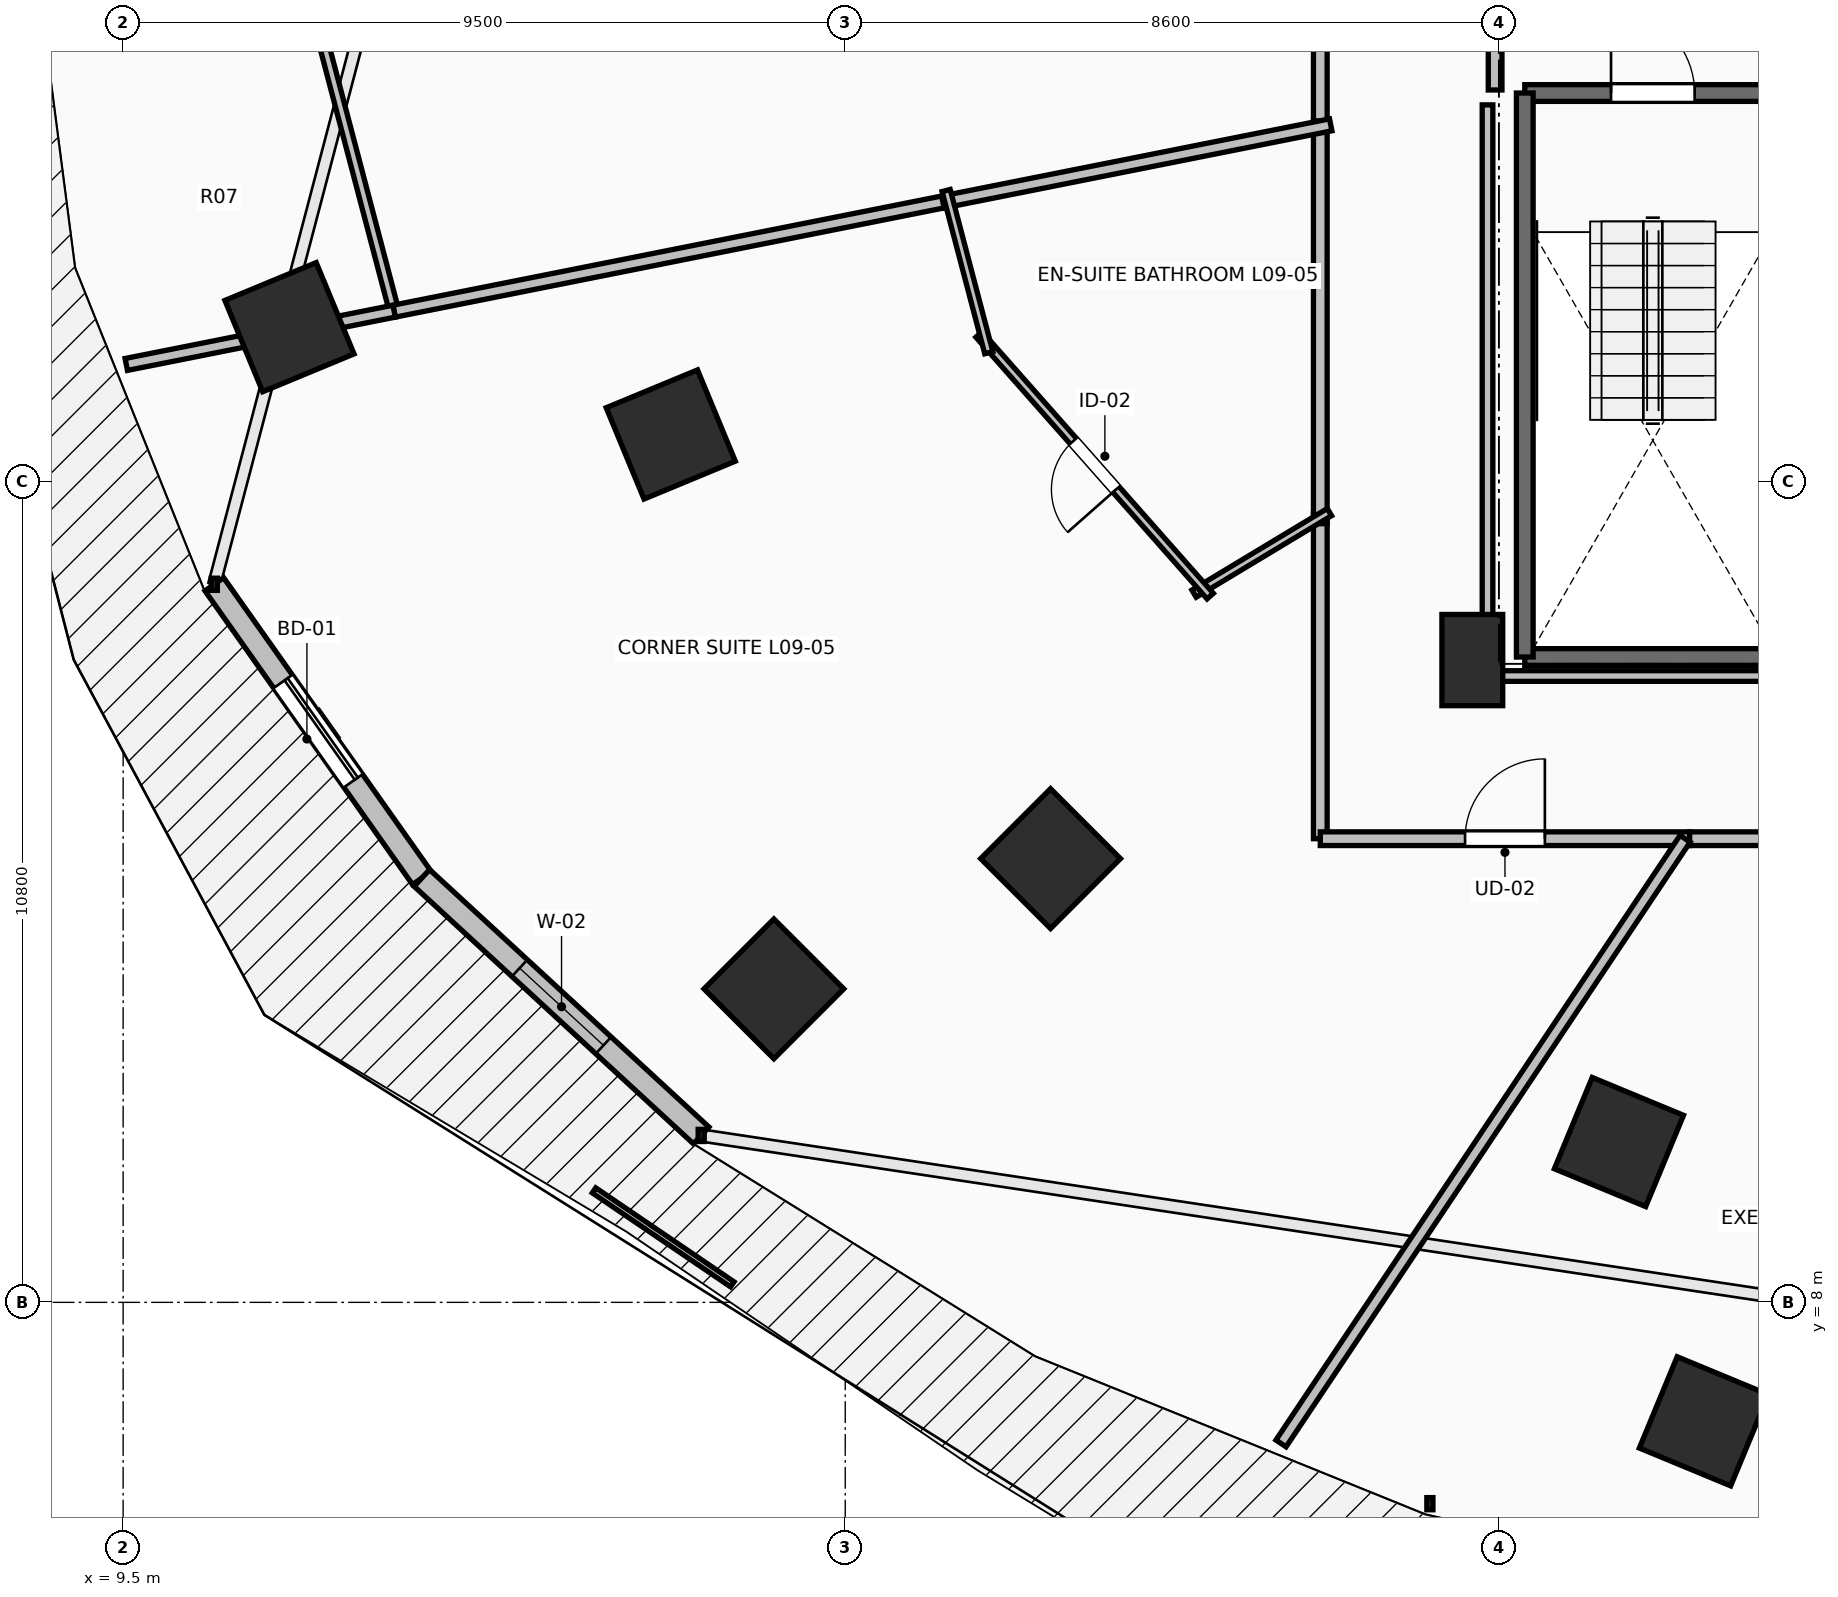
"""IFC4 building model, lengths in metres.
Left out: names, types, materials, properties, quantities, classifications, styles, units other than length and angle.
Written with IfcOpenShell. Run it as: python <this file> out.ifc"""

import sys

from ifc_helpers import new_model, si_unit, direction, frame, frame_2d, origin, origin_2d, place, context, subcontext, project, spatial, rectangle, extrude, element, fill, save


model = new_model("IFC4")
c1 = context("Model", 3, precision=1e-05, world=origin(), true_north=direction((0.0, 1.0)))
c2 = subcontext(c1, "Body", "Model", "MODEL_VIEW")
j1 = project(units=[si_unit("LENGTHUNIT", "METRE"), si_unit("PLANEANGLEUNIT", "RADIAN")], contexts=[c1])
p1 = place(None, origin())
s1 = spatial("IfcSite", under=j1, at=p1, CompositionType="ELEMENT")
p2 = place(p1, origin())
s2 = spatial("IfcBuilding", under=s1, at=p2, CompositionType="ELEMENT")
p3 = place(p2, frame((0.0, 0.0, 38.0)))
s3 = spatial("IfcBuildingStorey", under=s2, at=p3, CompositionType="ELEMENT", Elevation=38.0)
for number, where, z_axis, x_axis in (
    (1, (16.705, 19.418, 0.0), (0.0, 0.0, 1.0), (-0.924, -0.383, 0.0)),
    (2, (21.701, 13.838, 0.0), (0.0, 0.0, 1.0), (-0.707, -0.707, 0.0)),
    (3, (29.179, 10.109, 0.0), (0.0, 0.0, 1.0), (-0.383, -0.924, 0.0)),
    (4, (11.688, 20.83, 0.0), (0.0, 0.0, 1.0), (-0.924, -0.383, 0.0)),
    (5, (18.061, 12.124, 0.0), (0.0, 0.0, 1.0), (-0.707, -0.707, 0.0)),
    (6, (30.297, 6.435, 0.0), (0.0, 0.0, 1.0), (-0.383, -0.924, 0.0)),
):
    element("IfcColumn", number, at=place(p3, frame(where, z_axis=z_axis, x_axis=x_axis)), inside=s3, PredefinedType="COLUMN", context=c2, shape_type="SweptSolid", body=[
        extrude(rectangle(XDim=1.3, YDim=1.3, at=origin_2d()), origin(), (0.0, 0.0, 1.0), 3.5),
    ])
p4 = place(p3, frame((27.25, 16.45, 0.0), z_axis=(0.0, 0.0, 1.0), x_axis=(1.0, 0.0, 0.0)))
e7 = element("IfcColumn", 7, at=p4, inside=s3, PredefinedType="PILASTER", context=c2, shape_type="SweptSolid", body=[
    extrude(rectangle(XDim=0.8, YDim=1.2, at=origin_2d()), origin(), (0.0, 0.0, 1.0), 3.5),
])
p5 = place(p3, frame((10.699, 17.447, 0.0), z_axis=(0.0, 0.0, 1.0), x_axis=(0.577130815624, -0.816651713803, 0.0)))
e8 = element("IfcWall", 8, at=p5, inside=s3, PredefinedType="STANDARD", context=c2, shape_type="SweptSolid", body=[
    extrude(rectangle(XDim=4.731, YDim=0.3, at=frame_2d((2.366, 0.0))), origin(), (0.0, 0.0, 1.0), 3.24),
])
p6 = place(p5, frame((1.566, 0.0, 0.0)))
e9 = element("IfcOpeningElement", 9, at=p6, cuts=e8, PredefinedType="OPENING", context=c2, shape_type="SweptSolid", body=[
    extrude(rectangle(XDim=1.6, YDim=2.3, at=frame_2d((0.8, 1.15))), frame((0.0, 0.165, 0.0), z_axis=(0.0, -1.0, 0.0), x_axis=(1.0, 0.0, 0.0)), (0.0, 0.0, 1.0), 0.33),
])
p7 = place(p3, frame((13.43, 13.583, 0.0), z_axis=(0.0, 0.0, 1.0), x_axis=(0.735342629635, -0.677695519419, 0.0)))
e10 = element("IfcWall", 10, at=p7, inside=s3, PredefinedType="STANDARD", context=c2, shape_type="SweptSolid", body=[
    extrude(rectangle(XDim=4.997, YDim=0.3, at=frame_2d((2.499, 0.0))), origin(), (0.0, 0.0, 1.0), 3.24),
])
p8 = place(p7, frame((1.749, 0.0, 0.85)))
e11 = element("IfcOpeningElement", 11, at=p8, cuts=e10, PredefinedType="OPENING", context=c2, shape_type="SweptSolid", body=[
    extrude(rectangle(XDim=1.5, YDim=2.19, at=frame_2d((0.75, 1.095))), frame((0.0, 0.165, 0.0), z_axis=(0.0, -1.0, 0.0), x_axis=(1.0, 0.0, 0.0)), (0.0, 0.0, 1.0), 0.33),
])
p9 = place(p3, frame((27.94, 23.91, 0.0), z_axis=(0.0, 0.0, 1.0), x_axis=(1.0, 0.0, 0.0)))
e12 = element("IfcWall", 12, at=p9, inside=s3, PredefinedType="SOLIDWALL", context=c2, shape_type="SweptSolid", body=[
    extrude(rectangle(XDim=3.37, YDim=0.22, at=frame_2d((1.685, 0.0))), origin(), (0.0, 0.0, 1.0), 3.24),
])
p10 = place(p9, frame((1.135, 0.0, 0.0)))
e13 = element("IfcOpeningElement", 13, at=p10, cuts=e12, PredefinedType="OPENING", context=c2, shape_type="SweptSolid", body=[
    extrude(rectangle(XDim=1.1, YDim=2.15, at=frame_2d((0.55, 1.075))), frame((0.0, 0.125, 0.0), z_axis=(0.0, -1.0, 0.0), x_axis=(1.0, 0.0, 0.0)), (0.0, 0.0, 1.0), 0.25),
])
p11 = place(p3, frame((31.31, 16.49, 0.0), z_axis=(0.0, 0.0, 1.0), x_axis=(-1.0, 0.0, 0.0)))
e14 = element("IfcWall", 14, at=p11, inside=s3, PredefinedType="SOLIDWALL", context=c2, shape_type="SweptSolid", body=[
    extrude(rectangle(XDim=3.37, YDim=0.22, at=frame_2d((1.685, 0.0))), origin(), (0.0, 0.0, 1.0), 3.24),
])
p12 = place(p3, frame((27.94, 16.49, 0.0), z_axis=(0.0, 0.0, 1.0), x_axis=(0.0, 1.0, 0.0)))
e15 = element("IfcWall", 15, at=p12, inside=s3, PredefinedType="SOLIDWALL", context=c2, shape_type="SweptSolid", body=[
    extrude(rectangle(XDim=7.42, YDim=0.22, at=frame_2d((3.71, 0.0))), origin(), (0.0, 0.0, 1.0), 3.24),
])
p13 = place(p3, frame((27.55, 28.0, 0.0), z_axis=(0.0, 0.0, 1.0), x_axis=(0.0, -1.0, 0.0)))
e16 = element("IfcWall", 16, at=p13, inside=s3, PredefinedType="PARTITIONING", context=c2, shape_type="SweptSolid", body=[
    extrude(rectangle(XDim=4.05, YDim=0.18, at=frame_2d((2.025, 0.0))), origin(), (0.0, 0.0, 1.0), 3.24),
])
p14 = place(p13, frame((1.425, 0.0, 0.0)))
e17 = element("IfcOpeningElement", 17, at=p14, cuts=e16, PredefinedType="OPENING", context=c2, shape_type="SweptSolid", body=[
    extrude(rectangle(XDim=1.2, YDim=2.15, at=frame_2d((0.6, 1.075))), frame((0.0, 0.105, 0.0), z_axis=(0.0, -1.0, 0.0), x_axis=(1.0, 0.0, 0.0)), (0.0, 0.0, 1.0), 0.21),
])
p15 = place(p3, frame((25.25, 29.229, 0.0), z_axis=(0.0, 0.0, 1.0), x_axis=(0.0, -1.0, 0.0)))
e18 = element("IfcWall", 18, at=p15, inside=s3, PredefinedType="PARTITIONING", context=c2, shape_type="SweptSolid", body=[
    extrude(rectangle(XDim=5.826, YDim=0.18, at=frame_2d((2.913, 0.0))), origin(), (0.0, 0.0, 1.0), 2.432),
])
p16 = place(p15, frame((2.388, 0.0, 0.0)))
e19 = element("IfcOpeningElement", 19, at=p16, cuts=e18, PredefinedType="OPENING", context=c2, shape_type="SweptSolid", body=[
    extrude(rectangle(XDim=1.05, YDim=2.2, at=frame_2d((0.525, 1.1))), frame((0.0, 0.105, 0.0), z_axis=(0.0, -1.0, 0.0), x_axis=(1.0, 0.0, 0.0)), (0.0, 0.0, 1.0), 0.21),
])
p17 = place(p3, frame((25.25, 18.384, 0.0), z_axis=(0.0, 0.0, 1.0), x_axis=(0.0, -1.0, 0.0)))
e20 = element("IfcWall", 20, at=p17, inside=s3, PredefinedType="PARTITIONING", context=c2, shape_type="SweptSolid", body=[
    extrude(rectangle(XDim=4.284, YDim=0.18, at=frame_2d((2.142, 0.0))), origin(), (0.0, 0.0, 1.0), 2.432),
])
p18 = place(p3, frame((25.25, 14.1, 0.0), z_axis=(0.0, 0.0, 1.0), x_axis=(1.0, 0.0, 0.0)))
e21 = element("IfcWall", 21, at=p18, inside=s3, PredefinedType="PARTITIONING", context=c2, shape_type="SweptSolid", body=[
    extrude(rectangle(XDim=4.859, YDim=0.18, at=frame_2d((2.429, 0.0))), origin(), (0.0, 0.0, 1.0), 2.432),
])
p19 = place(p18, frame((1.905, 0.0, 0.0)))
e22 = element("IfcOpeningElement", 22, at=p19, cuts=e21, PredefinedType="OPENING", context=c2, shape_type="SweptSolid", body=[
    extrude(rectangle(XDim=1.05, YDim=2.2, at=frame_2d((0.525, 1.1))), frame((0.0, 0.105, 0.0), z_axis=(0.0, -1.0, 0.0), x_axis=(1.0, 0.0, 0.0)), (0.0, 0.0, 1.0), 0.21),
])
p20 = place(p3, frame((25.25, 23.543, 0.0), z_axis=(0.0, 0.0, 1.0), x_axis=(0.0, -1.0, 0.0)))
e23 = element("IfcWall", 23, at=p20, inside=s3, PredefinedType="PARTITIONING", context=c2, shape_type="SweptSolid", body=[
    extrude(rectangle(XDim=5.299, YDim=0.18, at=frame_2d((2.649, 0.0))), origin(), (0.0, 0.0, 1.0), 3.24),
])
p21 = place(p3, frame((30.109, 14.1, 0.0), z_axis=(0.0, 0.0, 1.0), x_axis=(1.0, 0.0, 0.0)))
e24 = element("IfcWall", 24, at=p21, inside=s3, PredefinedType="PARTITIONING", context=c2, shape_type="SweptSolid", body=[
    extrude(rectangle(XDim=10.319, YDim=0.18, at=frame_2d((5.16, 0.0))), origin(), (0.0, 0.0, 1.0), 3.24),
])
p22 = place(p21, frame((4.659, 0.0, 0.0)))
e25 = element("IfcOpeningElement", 25, at=p22, cuts=e24, PredefinedType="OPENING", context=c2, shape_type="SweptSolid", body=[
    extrude(rectangle(XDim=1.0, YDim=2.15, at=frame_2d((0.5, 1.075))), frame((0.0, 0.105, 0.0), z_axis=(0.0, -1.0, 0.0), x_axis=(1.0, 0.0, 0.0)), (0.0, 0.0, 1.0), 0.21),
])
p23 = place(p3, frame((11.76, 26.0, 0.0), z_axis=(0.0, 0.0, 1.0), x_axis=(0.254434720755, -0.967089950767, 0.0)))
e26 = element("IfcWall", 26, at=p23, inside=s3, PredefinedType="PARTITIONING", context=c2, shape_type="SweptSolid", body=[
    extrude(rectangle(XDim=5.129, YDim=0.125, at=frame_2d((2.564, 0.0))), origin(), (0.0, 0.0, 1.0), 2.432),
])
p24 = place(p3, frame((13.065, 21.04, 0.0), z_axis=(0.0, 0.0, 1.0), x_axis=(0.980774220135, 0.195145917502, 0.0)))
e27 = element("IfcWall", 27, at=p24, inside=s3, PredefinedType="PARTITIONING", context=c2, shape_type="SweptSolid", body=[
    extrude(rectangle(XDim=7.501, YDim=0.16, at=frame_2d((3.751, 0.0))), origin(), (0.0, 0.0, 1.0), 2.922),
])
p25 = place(p3, frame((20.285, 22.476, 0.0), z_axis=(0.0, 0.0, 1.0), x_axis=(0.980785905074, 0.195087181559, 0.0)))
e28 = element("IfcWall", 28, at=p25, inside=s3, PredefinedType="PARTITIONING", context=c2, shape_type="SweptSolid", body=[
    extrude(rectangle(XDim=5.202, YDim=0.16, at=frame_2d((2.601, 0.0))), origin(), (0.0, 0.0, 1.0), 2.972),
])
p26 = place(p3, frame((9.541, 20.339, 0.0), z_axis=(0.0, 0.0, 1.0), x_axis=(0.980786594985, 0.195083713053, 0.0)))
e29 = element("IfcWall", 29, at=p26, inside=s3, PredefinedType="PARTITIONING", context=c2, shape_type="SweptSolid", body=[
    extrude(rectangle(XDim=3.593, YDim=0.16, at=frame_2d((1.796, 0.0))), origin(), (0.0, 0.0, 1.0), 2.432),
])
p27 = place(p3, frame((25.37, 18.396, 0.0), z_axis=(0.0, 0.0, 1.0), x_axis=(-0.856631627837, -0.515928535932, 0.0)))
e30 = element("IfcWall", 30, at=p27, inside=s3, PredefinedType="PARTITIONING", context=c2, shape_type="SweptSolid", body=[
    extrude(rectangle(XDim=2.079, YDim=0.11, at=frame_2d((1.04, 0.0))), origin(), (0.0, 0.0, 1.0), 2.432),
])
p28 = place(p3, frame((23.802, 17.291, 0.0), z_axis=(0.0, 0.0, 1.0), x_axis=(-0.662071486681, 0.74944068913, 0.0)))
e31 = element("IfcWall", 31, at=p28, inside=s3, PredefinedType="PARTITIONING", context=c2, shape_type="SweptSolid", body=[
    extrude(rectangle(XDim=4.594, YDim=0.11, at=frame_2d((2.297, 0.0))), origin(), (0.0, 0.0, 1.0), 2.432),
])
p29 = place(p28, frame((1.872, 0.0, 0.0)))
e32 = element("IfcOpeningElement", 32, at=p29, cuts=e31, PredefinedType="OPENING", context=c2, shape_type="SweptSolid", body=[
    extrude(rectangle(XDim=0.85, YDim=2.1, at=frame_2d((0.425, 1.05))), frame((0.0, 0.07, 0.0), z_axis=(0.0, -1.0, 0.0), x_axis=(1.0, 0.0, 0.0)), (0.0, 0.0, 1.0), 0.14),
])
p30 = place(p3, frame((20.889, 20.494, 0.0), z_axis=(0.0, 0.0, 1.0), x_axis=(-0.254389812051, 0.967101764823, 0.0)))
e33 = element("IfcWall", 33, at=p30, inside=s3, PredefinedType="PARTITIONING", context=c2, shape_type="SweptSolid", body=[
    extrude(rectangle(XDim=2.206, YDim=0.11, at=frame_2d((1.103, 0.0))), origin(), (0.0, 0.0, 1.0), 3.24),
])
p31 = place(p3, frame((24.733, 6.144, 0.0), z_axis=(0.0, 0.0, 1.0), x_axis=(0.555577192504, 0.831464962082, 0.0)))
e34 = element("IfcWall", 34, at=p31, inside=s3, PredefinedType="PARTITIONING", context=c2, shape_type="SweptSolid", body=[
    extrude(rectangle(XDim=9.569, YDim=0.16, at=frame_2d((4.784, 0.0))), origin(), (0.0, 0.0, 1.0), 2.432),
])
p32 = place(p3, frame((31.195, 16.24, 0.0), z_axis=(0.0, 0.0, 1.0), x_axis=(-1.0, 0.0, 0.0)))
e35 = element("IfcWall", 35, at=p32, inside=s3, PredefinedType="PARTITIONING", context=c2, shape_type="SweptSolid", body=[
    extrude(rectangle(XDim=3.745, YDim=0.14, at=frame_2d((1.873, 0.0))), origin(), (0.0, 0.0, 1.0), 2.432),
])
p33 = place(p3, frame((27.45, 16.24, 0.0), z_axis=(0.0, 0.0, 1.0), x_axis=(0.0, 1.0, 0.0)))
e36 = element("IfcWall", 36, at=p33, inside=s3, PredefinedType="PARTITIONING", context=c2, shape_type="SweptSolid", body=[
    extrude(rectangle(XDim=7.514, YDim=0.14, at=frame_2d((3.757, 0.0))), origin(), (0.0, 0.0, 1.0), 2.432),
])
p34 = place(p6, origin())
e37 = element("IfcDoor", 37, at=p34, inside=s3, OperationType="SLIDING_TO_LEFT", PredefinedType="DOOR", context=c2, shape_type="SweptSolid", body=[
    extrude(rectangle(XDim=1.6, YDim=2.3, at=frame_2d((0.8, 1.15))), frame((0.0, 0.025, 0.0), z_axis=(0.0, -1.0, 0.0), x_axis=(1.0, 0.0, 0.0)), (0.0, 0.0, 1.0), 0.05),
])
fill(e9, e37)
p35 = place(p8, origin())
e38 = element("IfcWindow", 38, at=p35, inside=s3, PartitioningType="SINGLE_PANEL", PredefinedType="WINDOW", context=c2, shape_type="SweptSolid", body=[
    extrude(rectangle(XDim=1.5, YDim=2.19, at=frame_2d((0.75, 1.095))), frame((0.0, 0.03, 0.0), z_axis=(0.0, -1.0, 0.0), x_axis=(1.0, 0.0, 0.0)), (0.0, 0.0, 1.0), 0.06),
])
fill(e11, e38)
p36 = place(p10, origin())
e39 = element("IfcDoor", 39, at=p36, inside=s3, OperationType="SINGLE_SWING_LEFT", PredefinedType="DOOR", context=c2, shape_type="SweptSolid", body=[
    extrude(rectangle(XDim=1.1, YDim=2.15, at=frame_2d((0.55, 1.075))), frame((0.0, 0.025, 0.0), z_axis=(0.0, -1.0, 0.0), x_axis=(1.0, 0.0, 0.0)), (0.0, 0.0, 1.0), 0.05),
])
fill(e13, e39)
p37 = place(p19, origin())
e40 = element("IfcDoor", 40, at=p37, inside=s3, OperationType="SINGLE_SWING_RIGHT", PredefinedType="DOOR", context=c2, shape_type="SweptSolid", body=[
    extrude(rectangle(XDim=1.05, YDim=2.2, at=frame_2d((0.525, 1.1))), frame((0.0, 0.025, 0.0), z_axis=(0.0, -1.0, 0.0), x_axis=(1.0, 0.0, 0.0)), (0.0, 0.0, 1.0), 0.05),
])
fill(e22, e40)
p38 = place(p29, origin())
e41 = element("IfcDoor", 41, at=p38, inside=s3, OperationType="SINGLE_SWING_LEFT", PredefinedType="DOOR", context=c2, shape_type="SweptSolid", body=[
    extrude(rectangle(XDim=0.85, YDim=2.1, at=frame_2d((0.425, 1.05))), frame((0.0, 0.025, 0.0), z_axis=(0.0, -1.0, 0.0), x_axis=(1.0, 0.0, 0.0)), (0.0, 0.0, 1.0), 0.05),
])
fill(e32, e41)
save(model, sys.argv[1])
